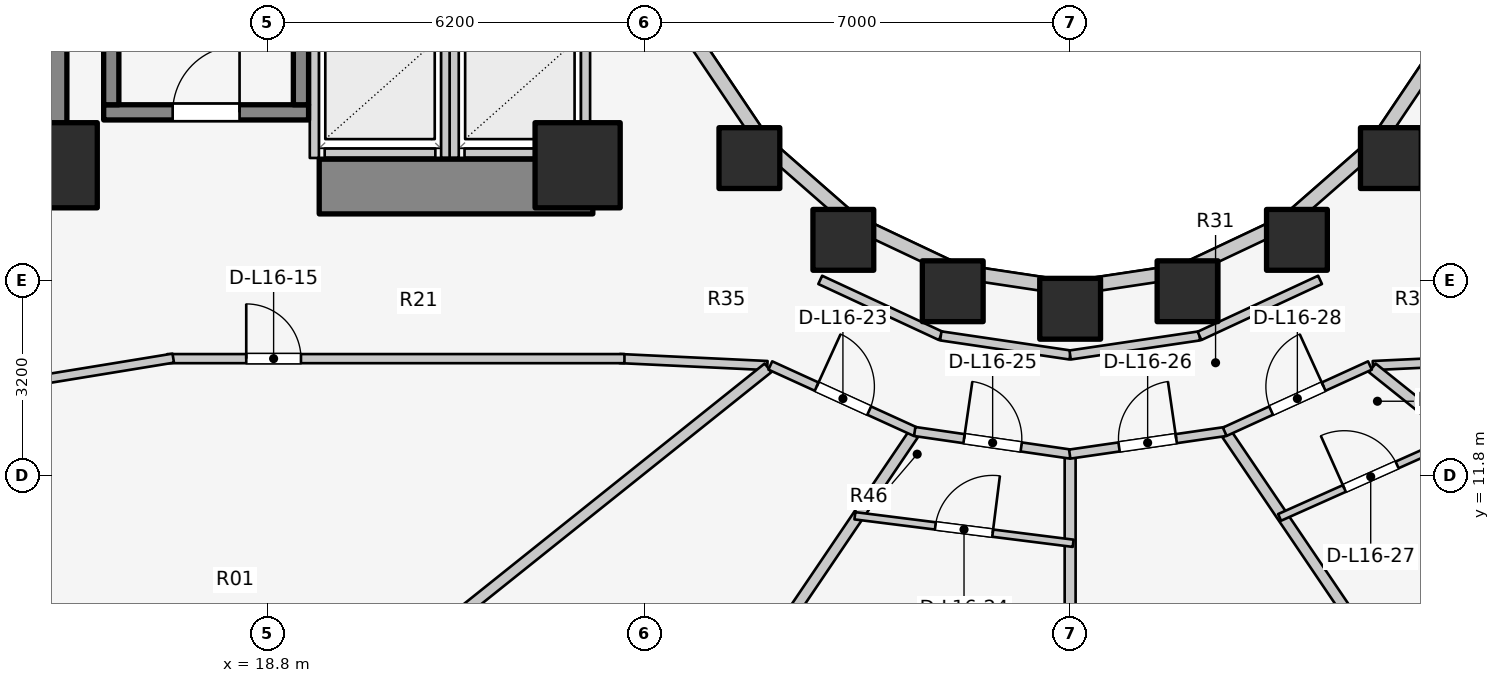
"""IFC4 building model, lengths in metres.
Left out: names, types, materials, properties, quantities, classifications, styles, units other than length and angle.
Written with IfcOpenShell. Run it as: python <this file> out.ifc"""

import sys

from ifc_helpers import new_model, si_unit, direction, frame, frame_2d, origin, origin_2d, place, context, subcontext, project, spatial, rectangle, extrude, element, fill, save


model = new_model("IFC4")
c1 = context("Model", 3, precision=1e-05, world=origin(), true_north=direction((0.0, 1.0)))
c2 = subcontext(c1, "Body", "Model", "MODEL_VIEW")
j1 = project(units=[si_unit("LENGTHUNIT", "METRE"), si_unit("PLANEANGLEUNIT", "RADIAN")], contexts=[c1])
p1 = place(None, origin())
s1 = spatial("IfcSite", under=j1, at=p1, CompositionType="ELEMENT")
p2 = place(p1, origin())
s2 = spatial("IfcBuilding", under=s1, at=p2, CompositionType="ELEMENT")
p3 = place(p2, frame((0.0, 0.0, 55.5)))
s3 = spatial("IfcBuildingStorey", under=s2, at=p3, CompositionType="ELEMENT", Elevation=55.5)
p4 = place(p3, frame((15.05, 17.05, 0.0), z_axis=(0.0, 0.0, 1.0), x_axis=(0.0, 1.0, 0.0)))
e1 = element("IfcWall", 1, at=p4, inside=s3, PredefinedType="SHEAR", context=c2, shape_type="SweptSolid", body=[
    extrude(rectangle(XDim=12.8, YDim=0.9, at=frame_2d((6.4, 0.0))), origin(), (0.0, 0.0, 1.0), 3.1),
])
p5 = place(p3, frame((19.65, 16.55, 0.0), z_axis=(0.0, 0.0, 1.0), x_axis=(1.0, 0.0, 0.0)))
e2 = element("IfcWall", 2, at=p5, inside=s3, PredefinedType="SHEAR", context=c2, shape_type="SweptSolid", body=[
    extrude(rectangle(XDim=4.5, YDim=0.9, at=frame_2d((2.25, 0.0))), origin(), (0.0, 0.0, 1.0), 3.1),
])
p6 = place(p3, frame((16.105, 17.77, 0.0), z_axis=(0.0, 0.0, 1.0), x_axis=(1.0, 0.0, 0.0)))
e3 = element("IfcWall", 3, at=p6, inside=s3, PredefinedType="SOLIDWALL", context=c2, shape_type="SweptSolid", body=[
    extrude(rectangle(XDim=3.37, YDim=0.25, at=frame_2d((1.685, 0.0))), origin(), (0.0, 0.0, 1.0), 3.1),
])
p7 = place(p6, frame((1.135, 0.0, 0.0)))
e4 = element("IfcOpeningElement", 4, at=p7, cuts=e3, PredefinedType="OPENING", context=c2, shape_type="SweptSolid", body=[
    extrude(rectangle(XDim=1.1, YDim=2.1, at=frame_2d((0.55, 1.05))), frame((0.0, 0.135, 0.0), z_axis=(0.0, -1.0, 0.0), x_axis=(1.0, 0.0, 0.0)), (0.0, 0.0, 1.0), 0.27),
])
for number, where, z_axis, x_axis in (
    (5, (16.23, 17.895, 0.0), (0.0, 0.0, 1.0), (0.0, 1.0, 0.0)),
    (6, (19.35, 17.895, 0.0), (0.0, 0.0, 1.0), (0.0, 1.0, 0.0)),
):
    element("IfcWall", number, at=place(p3, frame(where, z_axis=z_axis, x_axis=x_axis)), inside=s3, PredefinedType="SOLIDWALL", context=c2, shape_type="SweptSolid", body=[
        extrude(rectangle(XDim=7.81, YDim=0.25, at=frame_2d((3.905, 0.0))), origin(), (0.0, 0.0, 1.0), 3.1),
    ])
for number, where, z_axis, x_axis in (
    (7, (15.3, 16.9, 0.0), (0.0, 0.0, 1.0), (1.0, 0.0, 0.0)),
    (8, (23.9, 16.9, 0.0), (0.0, 0.0, 1.0), (1.0, 0.0, 0.0)),
):
    element("IfcColumn", number, at=place(p3, frame(where, z_axis=z_axis, x_axis=x_axis)), inside=s3, PredefinedType="COLUMN", context=c2, shape_type="SweptSolid", body=[
        extrude(rectangle(XDim=1.4, YDim=1.4, at=origin_2d()), origin(), (0.0, 0.0, 1.0), 3.1),
    ])
for number, where, z_axis, x_axis in (
    (9, (26.725, 17.018, 0.0), (0.0, 0.0, 1.0), (1.0, 0.0, 0.0)),
    (10, (28.27, 15.673, 0.0), (0.0, 0.0, 1.0), (1.0, 0.0, 0.0)),
    (11, (30.069, 14.828, 0.0), (0.0, 0.0, 1.0), (1.0, 0.0, 0.0)),
    (12, (32.0, 14.54, 0.0), (0.0, 0.0, 1.0), (1.0, 0.0, 0.0)),
    (13, (33.931, 14.828, 0.0), (0.0, 0.0, 1.0), (1.0, 0.0, 0.0)),
    (14, (35.73, 15.673, 0.0), (0.0, 0.0, 1.0), (1.0, 0.0, 0.0)),
    (15, (37.275, 17.018, 0.0), (0.0, 0.0, 1.0), (1.0, 0.0, 0.0)),
):
    element("IfcColumn", number, at=place(p3, frame(where, z_axis=z_axis, x_axis=x_axis)), inside=s3, PredefinedType="COLUMN", context=c2, shape_type="SweptSolid", body=[
        extrude(rectangle(XDim=1.0, YDim=1.0, at=origin_2d()), origin(), (0.0, 0.0, 1.0), 3.1),
    ])
p8 = place(p3, frame((25.834, 18.94, 0.0), z_axis=(0.0, 0.0, 1.0), x_axis=(0.558197800898, -0.829707909492, 0.0)))
e16 = element("IfcWall", 16, at=p8, inside=s3, PredefinedType="STANDARD", context=c2, shape_type="SweptSolid", body=[
    extrude(rectangle(XDim=2.027, YDim=0.23, at=frame_2d((1.013, 0.0))), origin(), (0.0, 0.0, 1.0), 2.16),
])
p9 = place(p3, frame((26.965, 17.258, 0.0), z_axis=(0.0, 0.0, 1.0), x_axis=(0.752576694707, -0.658504607869, 0.0)))
e17 = element("IfcWall", 17, at=p9, inside=s3, PredefinedType="STANDARD", context=c2, shape_type="SweptSolid", body=[
    extrude(rectangle(XDim=1.959, YDim=0.23, at=frame_2d((0.98, 0.0))), origin(), (0.0, 0.0, 1.0), 2.16),
])
p10 = place(p3, frame((28.44, 15.968, 0.0), z_axis=(0.0, 0.0, 1.0), x_axis=(0.904179699603, -0.427152280606, 0.0)))
e18 = element("IfcWall", 18, at=p10, inside=s3, PredefinedType="STANDARD", context=c2, shape_type="SweptSolid", body=[
    extrude(rectangle(XDim=1.899, YDim=0.23, at=frame_2d((0.95, 0.0))), origin(), (0.0, 0.0, 1.0), 2.16),
])
for number, where, z_axis, x_axis in (
    (19, (30.157, 15.157, 0.0), (0.0, 0.0, 1.0), (0.989, -0.149, 0.0)),
    (20, (32.0, 14.88, 0.0), (0.0, 0.0, 1.0), (0.989, 0.149, 0.0)),
):
    element("IfcWall", number, at=place(p3, frame(where, z_axis=z_axis, x_axis=x_axis)), inside=s3, PredefinedType="STANDARD", context=c2, shape_type="SweptSolid", body=[
        extrude(rectangle(XDim=1.864, YDim=0.23, at=frame_2d((0.932, 0.0))), origin(), (0.0, 0.0, 1.0), 2.16),
    ])
p11 = place(p3, frame((33.843, 15.157, 0.0), z_axis=(0.0, 0.0, 1.0), x_axis=(0.904179699603, 0.427152280606, 0.0)))
e21 = element("IfcWall", 21, at=p11, inside=s3, PredefinedType="STANDARD", context=c2, shape_type="SweptSolid", body=[
    extrude(rectangle(XDim=1.899, YDim=0.23, at=frame_2d((0.95, 0.0))), origin(), (0.0, 0.0, 1.0), 2.16),
])
p12 = place(p3, frame((35.56, 15.968, 0.0), z_axis=(0.0, 0.0, 1.0), x_axis=(0.752576694707, 0.658504607869, 0.0)))
e22 = element("IfcWall", 22, at=p12, inside=s3, PredefinedType="STANDARD", context=c2, shape_type="SweptSolid", body=[
    extrude(rectangle(XDim=1.959, YDim=0.23, at=frame_2d((0.98, 0.0))), origin(), (0.0, 0.0, 1.0), 2.16),
])
p13 = place(p3, frame((37.035, 17.258, 0.0), z_axis=(0.0, 0.0, 1.0), x_axis=(0.558197800898, 0.829707909492, 0.0)))
e23 = element("IfcWall", 23, at=p13, inside=s3, PredefinedType="STANDARD", context=c2, shape_type="SweptSolid", body=[
    extrude(rectangle(XDim=2.027, YDim=0.23, at=frame_2d((1.013, 0.0))), origin(), (0.0, 0.0, 1.0), 2.16),
])
p14 = place(p3, frame((19.74, 17.1, 0.0), z_axis=(0.0, 0.0, 1.0), x_axis=(1.0, 0.0, 0.0)))
e24 = element("IfcWall", 24, at=p14, inside=s3, PredefinedType="SOLIDWALL", context=c2, shape_type="SweptSolid", body=[
    extrude(rectangle(XDim=1.82, YDim=0.15, at=frame_2d((0.91, 0.0))), origin(), (0.0, 0.0, 1.0), 2.855),
])
p15 = place(p3, frame((19.57, 17.02, 0.0), z_axis=(0.0, 0.0, 1.0), x_axis=(0.0, 1.0, 0.0)))
e25 = element("IfcWall", 25, at=p15, inside=s3, PredefinedType="SOLIDWALL", context=c2, shape_type="SweptSolid", body=[
    extrude(rectangle(XDim=2.22, YDim=0.15, at=frame_2d((1.11, 0.0))), origin(), (0.0, 0.0, 1.0), 2.12),
])
p16 = place(p3, frame((21.73, 17.02, 0.0), z_axis=(0.0, 0.0, 1.0), x_axis=(0.0, 1.0, 0.0)))
e26 = element("IfcWall", 26, at=p16, inside=s3, PredefinedType="SOLIDWALL", context=c2, shape_type="SweptSolid", body=[
    extrude(rectangle(XDim=2.22, YDim=0.15, at=frame_2d((1.11, 0.0))), origin(), (0.0, 0.0, 1.0), 2.855),
])
p17 = place(p3, frame((22.04, 17.1, 0.0), z_axis=(0.0, 0.0, 1.0), x_axis=(1.0, 0.0, 0.0)))
e27 = element("IfcWall", 27, at=p17, inside=s3, PredefinedType="SOLIDWALL", context=c2, shape_type="SweptSolid", body=[
    extrude(rectangle(XDim=1.82, YDim=0.15, at=frame_2d((0.91, 0.0))), origin(), (0.0, 0.0, 1.0), 2.12),
])
p18 = place(p3, frame((21.87, 17.02, 0.0), z_axis=(0.0, 0.0, 1.0), x_axis=(0.0, 1.0, 0.0)))
e28 = element("IfcWall", 28, at=p18, inside=s3, PredefinedType="SOLIDWALL", context=c2, shape_type="SweptSolid", body=[
    extrude(rectangle(XDim=2.22, YDim=0.15, at=frame_2d((1.11, 0.0))), origin(), (0.0, 0.0, 1.0), 2.855),
])
p19 = place(p3, frame((24.03, 17.02, 0.0), z_axis=(0.0, 0.0, 1.0), x_axis=(0.0, 1.0, 0.0)))
e29 = element("IfcWall", 29, at=p19, inside=s3, PredefinedType="SOLIDWALL", context=c2, shape_type="SweptSolid", body=[
    extrude(rectangle(XDim=2.22, YDim=0.15, at=frame_2d((1.11, 0.0))), origin(), (0.0, 0.0, 1.0), 2.12),
])
p20 = place(p3, frame((27.89, 15.015, 0.0), z_axis=(0.0, 0.0, 1.0), x_axis=(0.906943449489, -0.421252393975, 0.0)))
e30 = element("IfcWall", 30, at=p20, inside=s3, PredefinedType="PARTITIONING", context=c2, shape_type="SweptSolid", body=[
    extrude(rectangle(XDim=2.186, YDim=0.15, at=frame_2d((1.093, 0.0))), origin(), (0.0, 0.0, 1.0), 2.237),
])
for number, where, z_axis, x_axis in (
    (31, (29.873, 14.094, 0.0), (0.0, 0.0, 1.0), (0.989, -0.146, 0.0)),
    (32, (32.0, 13.78, 0.0), (0.0, 0.0, 1.0), (0.989, 0.146, 0.0)),
):
    element("IfcWall", number, at=place(p3, frame(where, z_axis=z_axis, x_axis=x_axis)), inside=s3, PredefinedType="PARTITIONING", context=c2, shape_type="SweptSolid", body=[
        extrude(rectangle(XDim=2.151, YDim=0.15, at=frame_2d((1.075, 0.0))), origin(), (0.0, 0.0, 1.0), 2.237),
    ])
p21 = place(p3, frame((34.127, 14.094, 0.0), z_axis=(0.0, 0.0, 1.0), x_axis=(0.906943449489, 0.421252393975, 0.0)))
e33 = element("IfcWall", 33, at=p21, inside=s3, PredefinedType="PARTITIONING", context=c2, shape_type="SweptSolid", body=[
    extrude(rectangle(XDim=2.186, YDim=0.15, at=frame_2d((1.093, 0.0))), origin(), (0.0, 0.0, 1.0), 2.237),
])
p22 = place(p3, frame((27.02, 13.606, 0.0), z_axis=(0.0, 0.0, 1.0), x_axis=(-0.998877427952, 0.047369651964, 0.0)))
e34 = element("IfcWall", 34, at=p22, inside=s3, PredefinedType="PARTITIONING", context=c2, shape_type="SweptSolid", body=[
    extrude(rectangle(XDim=2.433, YDim=0.15, at=frame_2d((1.216, 0.0))), origin(), (0.0, 0.0, 1.0), 2.237),
])
p23 = place(p3, frame((17.15, 13.72, 0.0), z_axis=(0.0, 0.0, 1.0), x_axis=(1.0, 0.0, 0.0)))
e35 = element("IfcWall", 35, at=p23, inside=s3, PredefinedType="PARTITIONING", context=c2, shape_type="SweptSolid", body=[
    extrude(rectangle(XDim=7.52, YDim=0.15, at=frame_2d((3.76, 0.0))), origin(), (0.0, 0.0, 1.0), 2.237),
])
p24 = place(p23, frame((1.3, 0.0, 0.0)))
e36 = element("IfcOpeningElement", 36, at=p24, cuts=e35, PredefinedType="OPENING", context=c2, shape_type="SweptSolid", body=[
    extrude(rectangle(XDim=0.9, YDim=2.1, at=frame_2d((0.45, 1.05))), frame((0.0, 0.085, 0.0), z_axis=(0.0, -1.0, 0.0), x_axis=(1.0, 0.0, 0.0)), (0.0, 0.0, 1.0), 0.17),
])
p25 = place(p3, frame((17.249, 13.728, 0.0), z_axis=(0.0, 0.0, 1.0), x_axis=(-0.98693078372, -0.161144742846, 0.0)))
e37 = element("IfcWall", 37, at=p25, inside=s3, PredefinedType="PARTITIONING", context=c2, shape_type="SweptSolid", body=[
    extrude(rectangle(XDim=7.557, YDim=0.15, at=frame_2d((3.779, 0.0))), origin(), (0.0, 0.0, 1.0), 2.069),
])
p26 = place(p3, frame((36.98, 13.606, 0.0), z_axis=(0.0, 0.0, 1.0), x_axis=(0.998877427952, 0.047369651964, 0.0)))
e38 = element("IfcWall", 38, at=p26, inside=s3, PredefinedType="PARTITIONING", context=c2, shape_type="SweptSolid", body=[
    extrude(rectangle(XDim=2.433, YDim=0.15, at=frame_2d((1.216, 0.0))), origin(), (0.0, 0.0, 1.0), 2.237),
])
p27 = place(p3, frame((27.032, 13.569, 0.0), z_axis=(0.0, 0.0, 1.0), x_axis=(-0.781055486744, -0.624461629428, 0.0)))
e39 = element("IfcWall", 39, at=p27, inside=s3, PredefinedType="PARTITIONING", context=c2, shape_type="SweptSolid", body=[
    extrude(rectangle(XDim=10.843, YDim=0.18, at=frame_2d((5.422, 0.0))), origin(), (0.0, 0.0, 1.0), 2.237),
])
p28 = place(p3, frame((29.42, 12.474, 0.0), z_axis=(0.0, 0.0, 1.0), x_axis=(-0.560641882674, -0.828058379217, 0.0)))
e40 = element("IfcWall", 40, at=p28, inside=s3, PredefinedType="PARTITIONING", context=c2, shape_type="SweptSolid", body=[
    extrude(rectangle(XDim=9.658, YDim=0.18, at=frame_2d((4.829, 0.0))), origin(), (0.0, 0.0, 1.0), 2.237),
])
p29 = place(p3, frame((32.0, 12.095, 0.0), z_axis=(0.0, 0.0, 1.0), x_axis=(0.0, -1.0, 0.0)))
e41 = element("IfcWall", 41, at=p29, inside=s3, PredefinedType="PARTITIONING", context=c2, shape_type="SweptSolid", body=[
    extrude(rectangle(XDim=8.395, YDim=0.18, at=frame_2d((4.198, 0.0))), origin(), (0.0, 0.0, 1.0), 2.237),
])
p30 = place(p3, frame((34.58, 12.474, 0.0), z_axis=(0.0, 0.0, 1.0), x_axis=(0.560641882674, -0.828058379217, 0.0)))
e42 = element("IfcWall", 42, at=p30, inside=s3, PredefinedType="PARTITIONING", context=c2, shape_type="SweptSolid", body=[
    extrude(rectangle(XDim=9.658, YDim=0.18, at=frame_2d((4.829, 0.0))), origin(), (0.0, 0.0, 1.0), 2.237),
])
p31 = place(p3, frame((36.968, 13.569, 0.0), z_axis=(0.0, 0.0, 1.0), x_axis=(0.781055486744, -0.624461629428, 0.0)))
e43 = element("IfcWall", 43, at=p31, inside=s3, PredefinedType="PARTITIONING", context=c2, shape_type="SweptSolid", body=[
    extrude(rectangle(XDim=10.843, YDim=0.18, at=frame_2d((5.422, 0.0))), origin(), (0.0, 0.0, 1.0), 2.237),
])
p32 = place(p3, frame((27.069, 13.607, 0.0), z_axis=(0.0, 0.0, 1.0), x_axis=(0.909747571199, -0.415161843982, 0.0)))
e44 = element("IfcWall", 44, at=p32, inside=s3, PredefinedType="PARTITIONING", context=c2, shape_type="SweptSolid", body=[
    extrude(rectangle(XDim=2.625, YDim=0.15, at=frame_2d((1.312, 0.0))), origin(), (0.0, 0.0, 1.0), 2.237),
])
p33 = place(p32, frame((0.838, 0.0, 0.0)))
e45 = element("IfcOpeningElement", 45, at=p33, cuts=e44, PredefinedType="OPENING", context=c2, shape_type="SweptSolid", body=[
    extrude(rectangle(XDim=0.95, YDim=2.1, at=frame_2d((0.475, 1.05))), frame((0.0, 0.085, 0.0), z_axis=(0.0, -1.0, 0.0), x_axis=(1.0, 0.0, 0.0)), (0.0, 0.0, 1.0), 0.17),
])
p34 = place(p3, frame((28.46, 11.136, 0.0), z_axis=(0.0, 0.0, 1.0), x_axis=(0.99214337853, -0.125106020798, 0.0)))
e46 = element("IfcWall", 46, at=p34, inside=s3, PredefinedType="MOVABLE", context=c2, shape_type="SweptSolid", body=[
    extrude(rectangle(XDim=3.618, YDim=0.12, at=frame_2d((1.809, 0.0))), origin(), (0.0, 0.0, 1.0), 2.237),
])
p35 = place(p34, frame((1.334, 0.0, 0.0)))
e47 = element("IfcOpeningElement", 47, at=p35, cuts=e46, PredefinedType="OPENING", context=c2, shape_type="SweptSolid", body=[
    extrude(rectangle(XDim=0.95, YDim=2.1, at=frame_2d((0.475, 1.05))), frame((0.0, 0.07, 0.0), z_axis=(0.0, -1.0, 0.0), x_axis=(1.0, 0.0, 0.0)), (0.0, 0.0, 1.0), 0.14),
])
p36 = place(p3, frame((29.444, 12.522, 0.0), z_axis=(0.0, 0.0, 1.0), x_axis=(0.989637894688, -0.143585644814, 0.0)))
e48 = element("IfcWall", 48, at=p36, inside=s3, PredefinedType="PARTITIONING", context=c2, shape_type="SweptSolid", body=[
    extrude(rectangle(XDim=2.59, YDim=0.15, at=frame_2d((1.295, 0.0))), origin(), (0.0, 0.0, 1.0), 2.237),
])
p37 = place(p36, frame((0.82, 0.0, 0.0)))
e49 = element("IfcOpeningElement", 49, at=p37, cuts=e48, PredefinedType="OPENING", context=c2, shape_type="SweptSolid", body=[
    extrude(rectangle(XDim=0.95, YDim=2.1, at=frame_2d((0.475, 1.05))), frame((0.0, 0.085, 0.0), z_axis=(0.0, -1.0, 0.0), x_axis=(1.0, 0.0, 0.0)), (0.0, 0.0, 1.0), 0.17),
])
p38 = place(p3, frame((31.993, 12.15, 0.0), z_axis=(0.0, 0.0, 1.0), x_axis=(0.989637894688, 0.143585644814, 0.0)))
e50 = element("IfcWall", 50, at=p38, inside=s3, PredefinedType="PARTITIONING", context=c2, shape_type="SweptSolid", body=[
    extrude(rectangle(XDim=2.59, YDim=0.15, at=frame_2d((1.295, 0.0))), origin(), (0.0, 0.0, 1.0), 2.237),
])
p39 = place(p38, frame((0.82, 0.0, 0.0)))
e51 = element("IfcOpeningElement", 51, at=p39, cuts=e50, PredefinedType="OPENING", context=c2, shape_type="SweptSolid", body=[
    extrude(rectangle(XDim=0.95, YDim=2.1, at=frame_2d((0.475, 1.05))), frame((0.0, 0.085, 0.0), z_axis=(0.0, -1.0, 0.0), x_axis=(1.0, 0.0, 0.0)), (0.0, 0.0, 1.0), 0.17),
])
p40 = place(p3, frame((35.445, 11.109, 0.0), z_axis=(0.0, 0.0, 1.0), x_axis=(0.913036999281, 0.407876743569, 0.0)))
e52 = element("IfcWall", 52, at=p40, inside=s3, PredefinedType="MOVABLE", context=c2, shape_type="SweptSolid", body=[
    extrude(rectangle(XDim=3.282, YDim=0.12, at=frame_2d((1.641, 0.0))), origin(), (0.0, 0.0, 1.0), 2.237),
])
p41 = place(p40, frame((1.166, 0.0, 0.0)))
e53 = element("IfcOpeningElement", 53, at=p41, cuts=e52, PredefinedType="OPENING", context=c2, shape_type="SweptSolid", body=[
    extrude(rectangle(XDim=0.95, YDim=2.1, at=frame_2d((0.475, 1.05))), frame((0.0, 0.07, 0.0), z_axis=(0.0, -1.0, 0.0), x_axis=(1.0, 0.0, 0.0)), (0.0, 0.0, 1.0), 0.14),
])
p42 = place(p3, frame((34.543, 12.518, 0.0), z_axis=(0.0, 0.0, 1.0), x_axis=(0.909747571199, 0.415161843982, 0.0)))
e54 = element("IfcWall", 54, at=p42, inside=s3, PredefinedType="PARTITIONING", context=c2, shape_type="SweptSolid", body=[
    extrude(rectangle(XDim=2.625, YDim=0.15, at=frame_2d((1.312, 0.0))), origin(), (0.0, 0.0, 1.0), 2.237),
])
p43 = place(p42, frame((0.838, 0.0, 0.0)))
e55 = element("IfcOpeningElement", 55, at=p43, cuts=e54, PredefinedType="OPENING", context=c2, shape_type="SweptSolid", body=[
    extrude(rectangle(XDim=0.95, YDim=2.1, at=frame_2d((0.475, 1.05))), frame((0.0, 0.085, 0.0), z_axis=(0.0, -1.0, 0.0), x_axis=(1.0, 0.0, 0.0)), (0.0, 0.0, 1.0), 0.17),
])
p44 = place(p7, origin())
e56 = element("IfcDoor", 56, at=p44, inside=s3, OperationType="SINGLE_SWING_RIGHT", PredefinedType="DOOR", context=c2, shape_type="SweptSolid", body=[
    extrude(rectangle(XDim=1.1, YDim=2.1, at=frame_2d((0.55, 1.05))), frame((0.0, 0.025, 0.0), z_axis=(0.0, -1.0, 0.0), x_axis=(1.0, 0.0, 0.0)), (0.0, 0.0, 1.0), 0.05),
])
fill(e4, e56)
p45 = place(p24, origin())
e57 = element("IfcDoor", 57, at=p45, inside=s3, OperationType="SINGLE_SWING_LEFT", PredefinedType="DOOR", context=c2, shape_type="SweptSolid", body=[
    extrude(rectangle(XDim=0.9, YDim=2.1, at=frame_2d((0.45, 1.05))), frame((0.0, 0.025, 0.0), z_axis=(0.0, -1.0, 0.0), x_axis=(1.0, 0.0, 0.0)), (0.0, 0.0, 1.0), 0.05),
])
fill(e36, e57)
p46 = place(p33, origin())
e58 = element("IfcDoor", 58, at=p46, inside=s3, OperationType="SINGLE_SWING_LEFT", PredefinedType="DOOR", context=c2, shape_type="SweptSolid", body=[
    extrude(rectangle(XDim=0.95, YDim=2.1, at=frame_2d((0.475, 1.05))), frame((0.0, 0.025, 0.0), z_axis=(0.0, -1.0, 0.0), x_axis=(1.0, 0.0, 0.0)), (0.0, 0.0, 1.0), 0.05),
])
fill(e45, e58)
p47 = place(p35, origin())
e59 = element("IfcDoor", 59, at=p47, inside=s3, OperationType="SINGLE_SWING_RIGHT", PredefinedType="DOOR", context=c2, shape_type="SweptSolid", body=[
    extrude(rectangle(XDim=0.95, YDim=2.1, at=frame_2d((0.475, 1.05))), frame((0.0, 0.025, 0.0), z_axis=(0.0, -1.0, 0.0), x_axis=(1.0, 0.0, 0.0)), (0.0, 0.0, 1.0), 0.05),
])
fill(e47, e59)
p48 = place(p37, origin())
e60 = element("IfcDoor", 60, at=p48, inside=s3, OperationType="SINGLE_SWING_LEFT", PredefinedType="DOOR", context=c2, shape_type="SweptSolid", body=[
    extrude(rectangle(XDim=0.95, YDim=2.1, at=frame_2d((0.475, 1.05))), frame((0.0, 0.025, 0.0), z_axis=(0.0, -1.0, 0.0), x_axis=(1.0, 0.0, 0.0)), (0.0, 0.0, 1.0), 0.05),
])
fill(e49, e60)
p49 = place(p39, origin())
e61 = element("IfcDoor", 61, at=p49, inside=s3, OperationType="SINGLE_SWING_RIGHT", PredefinedType="DOOR", context=c2, shape_type="SweptSolid", body=[
    extrude(rectangle(XDim=0.95, YDim=2.1, at=frame_2d((0.475, 1.05))), frame((0.0, 0.025, 0.0), z_axis=(0.0, -1.0, 0.0), x_axis=(1.0, 0.0, 0.0)), (0.0, 0.0, 1.0), 0.05),
])
fill(e51, e61)
p50 = place(p41, origin())
e62 = element("IfcDoor", 62, at=p50, inside=s3, OperationType="SINGLE_SWING_LEFT", PredefinedType="DOOR", context=c2, shape_type="SweptSolid", body=[
    extrude(rectangle(XDim=0.95, YDim=2.1, at=frame_2d((0.475, 1.05))), frame((0.0, 0.025, 0.0), z_axis=(0.0, -1.0, 0.0), x_axis=(1.0, 0.0, 0.0)), (0.0, 0.0, 1.0), 0.05),
])
fill(e53, e62)
p51 = place(p43, origin())
e63 = element("IfcDoor", 63, at=p51, inside=s3, OperationType="SINGLE_SWING_RIGHT", PredefinedType="DOOR", context=c2, shape_type="SweptSolid", body=[
    extrude(rectangle(XDim=0.95, YDim=2.1, at=frame_2d((0.475, 1.05))), frame((0.0, 0.025, 0.0), z_axis=(0.0, -1.0, 0.0), x_axis=(1.0, 0.0, 0.0)), (0.0, 0.0, 1.0), 0.05),
])
fill(e55, e63)
save(model, sys.argv[1])
